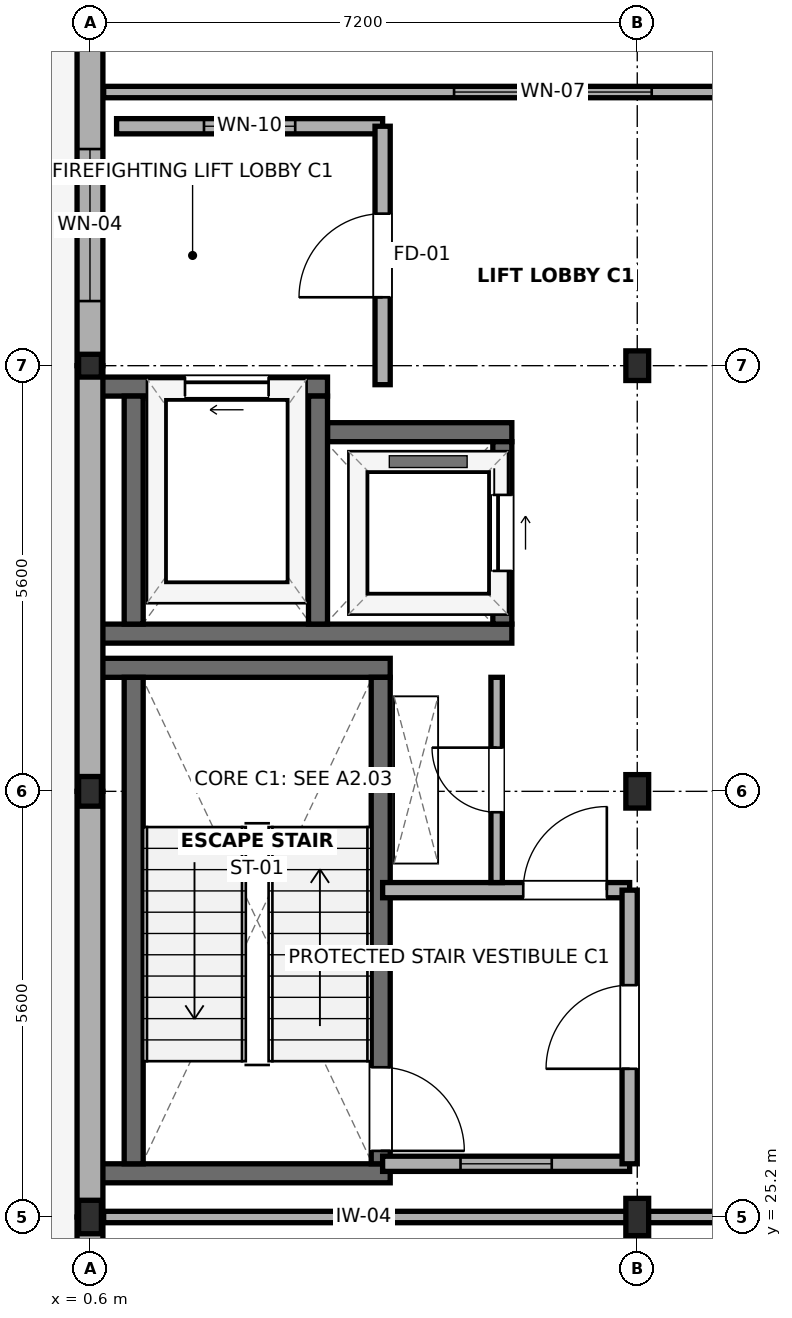
"""IFC4 building model, lengths in metres.
Left out: names, types, materials, properties, quantities, classifications, styles, units other than length and angle.
Written with IfcOpenShell. Run it as: python <this file> out.ifc"""

import sys

from ifc_helpers import new_model, si_unit, direction, frame, frame_2d, origin, origin_2d, place, context, subcontext, project, spatial, rectangle, i_section, extrude, element, fill, save


model = new_model("IFC4")
c1 = context("Model", 3, precision=1e-05, world=origin(), true_north=direction((0.0, 1.0)))
c2 = subcontext(c1, "Body", "Model", "MODEL_VIEW")
j1 = project(units=[si_unit("LENGTHUNIT", "METRE"), si_unit("PLANEANGLEUNIT", "RADIAN")], contexts=[c1])
p1 = place(None, origin())
s1 = spatial("IfcSite", under=j1, at=p1, CompositionType="ELEMENT")
p2 = place(p1, origin())
s2 = spatial("IfcBuilding", under=s1, at=p2, CompositionType="ELEMENT")
p3 = place(p2, frame((0.0, 0.0, 28.8)))
s3 = spatial("IfcBuildingStorey", under=s2, at=p3, CompositionType="ELEMENT", Elevation=28.8)
p4 = place(p3, frame((0.6, 25.2, 0.0), z_axis=(0.0, 0.0, 1.0), x_axis=(1.0, 0.0, 0.0)))
e1 = element("IfcColumn", 1, at=p4, inside=s3, PredefinedType="COLUMN", context=c2, shape_type="SweptSolid", body=[
    extrude(i_section(OverallWidth=0.3, OverallDepth=0.44, WebThickness=0.011, FlangeThickness=0.021, FilletRadius=0.027, at=origin_2d()), origin(), (0.0, 0.0, 1.0), 3.9),
])
p5 = place(p3, frame((0.6, 30.8, 0.0), z_axis=(0.0, 0.0, 1.0), x_axis=(1.0, 0.0, 0.0)))
e2 = element("IfcColumn", 2, at=p5, inside=s3, PredefinedType="COLUMN", context=c2, shape_type="SweptSolid", body=[
    extrude(i_section(OverallWidth=0.3, OverallDepth=0.39, WebThickness=0.011, FlangeThickness=0.019, FilletRadius=0.027, at=origin_2d()), origin(), (0.0, 0.0, 1.0), 3.9),
])
p6 = place(p3, frame((0.6, 36.4, 0.0), z_axis=(0.0, 0.0, 1.0), x_axis=(1.0, 0.0, 0.0)))
e3 = element("IfcColumn", 3, at=p6, inside=s3, PredefinedType="COLUMN", context=c2, shape_type="SweptSolid", body=[
    extrude(i_section(OverallWidth=0.3, OverallDepth=0.3, WebThickness=0.011, FlangeThickness=0.019, FilletRadius=0.027, at=origin_2d()), origin(), (0.0, 0.0, 1.0), 3.9),
])
p7 = place(p3, frame((7.8, 25.2, 0.0), z_axis=(0.0, 0.0, 1.0), x_axis=(1.0, 0.0, 0.0)))
e4 = element("IfcColumn", 4, at=p7, inside=s3, PredefinedType="COLUMN", context=c2, shape_type="SweptSolid", body=[
    extrude(i_section(OverallWidth=0.3, OverallDepth=0.49, WebThickness=0.012, FlangeThickness=0.023, FilletRadius=0.027, at=origin_2d()), origin(), (0.0, 0.0, 1.0), 3.9),
])
p8 = place(p3, frame((7.8, 30.8, 0.0), z_axis=(0.0, 0.0, 1.0), x_axis=(1.0, 0.0, 0.0)))
e5 = element("IfcColumn", 5, at=p8, inside=s3, PredefinedType="COLUMN", context=c2, shape_type="SweptSolid", body=[
    extrude(i_section(OverallWidth=0.3, OverallDepth=0.44, WebThickness=0.011, FlangeThickness=0.021, FilletRadius=0.027, at=origin_2d()), origin(), (0.0, 0.0, 1.0), 3.9),
])
p9 = place(p3, frame((7.8, 36.4, 0.0), z_axis=(0.0, 0.0, 1.0), x_axis=(1.0, 0.0, 0.0)))
e6 = element("IfcColumn", 6, at=p9, inside=s3, PredefinedType="COLUMN", context=c2, shape_type="SweptSolid", body=[
    extrude(i_section(OverallWidth=0.3, OverallDepth=0.39, WebThickness=0.011, FlangeThickness=0.019, FilletRadius=0.027, at=origin_2d()), origin(), (0.0, 0.0, 1.0), 3.9),
])
for number, where, z_axis, x_axis in (
    (7, (0.75, 25.775, 0.0), (0.0, 0.0, 1.0), (1.0, 0.0, 0.0)),
    (8, (0.75, 32.425, 0.0), (0.0, 0.0, 1.0), (1.0, 0.0, 0.0)),
):
    element("IfcWall", number, at=place(p3, frame(where, z_axis=z_axis, x_axis=x_axis)), inside=s3, PredefinedType="SHEAR", context=c2, shape_type="SweptSolid", body=[
        extrude(rectangle(XDim=3.8, YDim=0.25, at=frame_2d((1.9, 0.0))), origin(), (0.0, 0.0, 1.0), 3.72),
    ])
p10 = place(p3, frame((1.175, 25.9, 0.0), z_axis=(0.0, 0.0, 1.0), x_axis=(0.0, 1.0, 0.0)))
e9 = element("IfcWall", 9, at=p10, inside=s3, PredefinedType="SHEAR", context=c2, shape_type="SweptSolid", body=[
    extrude(rectangle(XDim=6.4, YDim=0.25, at=frame_2d((3.2, 0.0))), origin(), (0.0, 0.0, 1.0), 3.72),
])
p11 = place(p3, frame((4.425, 25.9, 0.0), z_axis=(0.0, 0.0, 1.0), x_axis=(0.0, 1.0, 0.0)))
e10 = element("IfcWall", 10, at=p11, inside=s3, PredefinedType="SHEAR", context=c2, shape_type="SweptSolid", body=[
    extrude(rectangle(XDim=6.4, YDim=0.25, at=frame_2d((3.2, 0.0))), origin(), (0.0, 0.0, 1.0), 3.72),
])
p12 = place(p11, frame((0.17, 0.0, 0.0)))
e11 = element("IfcOpeningElement", 11, at=p12, cuts=e10, PredefinedType="OPENING", context=c2, shape_type="SweptSolid", body=[
    extrude(rectangle(XDim=1.1, YDim=2.15, at=frame_2d((0.55, 1.075))), frame((0.0, 0.14, 0.0), z_axis=(0.0, -1.0, 0.0), x_axis=(1.0, 0.0, 0.0)), (0.0, 0.0, 1.0), 0.28),
])
p13 = place(p3, frame((0.75, 32.875, 0.0), z_axis=(0.0, 0.0, 1.0), x_axis=(1.0, 0.0, 0.0)))
e12 = element("IfcWall", 12, at=p13, inside=s3, PredefinedType="SHEAR", context=c2, shape_type="SweptSolid", body=[
    extrude(rectangle(XDim=5.4, YDim=0.25, at=frame_2d((2.7, 0.0))), origin(), (0.0, 0.0, 1.0), 3.72),
])
p14 = place(p3, frame((0.75, 36.125, 0.0), z_axis=(0.0, 0.0, 1.0), x_axis=(1.0, 0.0, 0.0)))
e13 = element("IfcWall", 13, at=p14, inside=s3, PredefinedType="SHEAR", context=c2, shape_type="SweptSolid", body=[
    extrude(rectangle(XDim=2.975, YDim=0.25, at=frame_2d((1.488, 0.0))), origin(), (0.0, 0.0, 1.0), 3.72),
])
p15 = place(p14, frame((1.1, 0.0, 0.0)))
e14 = element("IfcOpeningElement", 14, at=p15, cuts=e13, PredefinedType="OPENING", context=c2, shape_type="SweptSolid", body=[
    extrude(rectangle(XDim=1.1, YDim=2.15, at=frame_2d((0.55, 1.075))), frame((0.0, 0.14, 0.0), z_axis=(0.0, -1.0, 0.0), x_axis=(1.0, 0.0, 0.0)), (0.0, 0.0, 1.0), 0.28),
])
p16 = place(p3, frame((3.725, 35.525, 0.0), z_axis=(0.0, 0.0, 1.0), x_axis=(1.0, 0.0, 0.0)))
e15 = element("IfcWall", 15, at=p16, inside=s3, PredefinedType="SHEAR", context=c2, shape_type="SweptSolid", body=[
    extrude(rectangle(XDim=2.425, YDim=0.25, at=frame_2d((1.212, 0.0))), origin(), (0.0, 0.0, 1.0), 3.72),
])
for number, where, z_axis, x_axis in (
    (16, (1.175, 33.0, 0.0), (0.0, 0.0, 1.0), (0.0, 1.0, 0.0)),
    (17, (3.6, 33.0, 0.0), (0.0, 0.0, 1.0), (0.0, 1.0, 0.0)),
):
    element("IfcWall", number, at=place(p3, frame(where, z_axis=z_axis, x_axis=x_axis)), inside=s3, PredefinedType="SHEAR", context=c2, shape_type="SweptSolid", body=[
        extrude(rectangle(XDim=3.0, YDim=0.25, at=frame_2d((1.5, 0.0))), origin(), (0.0, 0.0, 1.0), 3.72),
    ])
p17 = place(p3, frame((6.025, 33.0, 0.0), z_axis=(0.0, 0.0, 1.0), x_axis=(0.0, 1.0, 0.0)))
e18 = element("IfcWall", 18, at=p17, inside=s3, PredefinedType="SHEAR", context=c2, shape_type="SweptSolid", body=[
    extrude(rectangle(XDim=2.4, YDim=0.25, at=frame_2d((1.2, 0.0))), origin(), (0.0, 0.0, 1.0), 3.72),
])
p18 = place(p17, frame((0.7, 0.0, 0.0)))
e19 = element("IfcOpeningElement", 19, at=p18, cuts=e18, PredefinedType="OPENING", context=c2, shape_type="SweptSolid", body=[
    extrude(rectangle(XDim=1.0, YDim=2.15, at=frame_2d((0.5, 1.075))), frame((0.0, 0.14, 0.0), z_axis=(0.0, -1.0, 0.0), x_axis=(1.0, 0.0, 0.0)), (0.0, 0.0, 1.0), 0.28),
])
p19 = place(p3, frame((0.6, 17.23, 0.0), z_axis=(0.0, 0.0, 1.0), x_axis=(0.0, 1.0, 0.0)))
e20 = element("IfcWall", 20, at=p19, inside=s3, PredefinedType="SOLIDWALL", context=c2, shape_type="SweptSolid", body=[
    extrude(rectangle(XDim=7.97, YDim=0.34, at=frame_2d((3.985, 0.0))), origin(), (0.0, 0.0, 1.0), 3.265),
])
p20 = place(p3, frame((0.6, 25.2, 0.0), z_axis=(0.0, 0.0, 1.0), x_axis=(0.0, 1.0, 0.0)))
e21 = element("IfcWall", 21, at=p20, inside=s3, PredefinedType="SOLIDWALL", context=c2, shape_type="SweptSolid", body=[
    extrude(rectangle(XDim=5.6, YDim=0.34, at=frame_2d((2.8, 0.0))), origin(), (0.0, 0.0, 1.0), 3.265),
])
p21 = place(p3, frame((0.6, 30.8, 0.0), z_axis=(0.0, 0.0, 1.0), x_axis=(0.0, 1.0, 0.0)))
e22 = element("IfcWall", 22, at=p21, inside=s3, PredefinedType="SOLIDWALL", context=c2, shape_type="SweptSolid", body=[
    extrude(rectangle(XDim=5.6, YDim=0.34, at=frame_2d((2.8, 0.0))), origin(), (0.0, 0.0, 1.0), 3.115),
])
p22 = place(p3, frame((0.6, 36.4, 0.0), z_axis=(0.0, 0.0, 1.0), x_axis=(0.0, 1.0, 0.0)))
e23 = element("IfcWall", 23, at=p22, inside=s3, PredefinedType="SOLIDWALL", context=c2, shape_type="SweptSolid", body=[
    extrude(rectangle(XDim=5.6, YDim=0.34, at=frame_2d((2.8, 0.0))), origin(), (0.0, 0.0, 1.0), 3.115),
])
p23 = place(p22, frame((0.85, 0.0, 0.9)))
e24 = element("IfcOpeningElement", 24, at=p23, cuts=e23, PredefinedType="OPENING", context=c2, shape_type="SweptSolid", body=[
    extrude(rectangle(XDim=2.0, YDim=1.8, at=frame_2d((1.0, 0.9))), frame((0.0, 0.185, 0.0), z_axis=(0.0, -1.0, 0.0), x_axis=(1.0, 0.0, 0.0)), (0.0, 0.0, 1.0), 0.37),
])
p24 = place(p3, frame((0.95, 39.55, 0.0), z_axis=(0.0, 0.0, 1.0), x_axis=(1.0, 0.0, 0.0)))
e25 = element("IfcWall", 25, at=p24, inside=s3, PredefinedType="PARTITIONING", context=c2, shape_type="SweptSolid", body=[
    extrude(rectangle(XDim=3.5, YDim=0.2, at=frame_2d((1.75, 0.0))), origin(), (0.0, 0.0, 1.0), 3.715),
])
p25 = place(p24, frame((1.15, 0.0, 0.95)))
e26 = element("IfcOpeningElement", 26, at=p25, cuts=e25, PredefinedType="OPENING", context=c2, shape_type="SweptSolid", body=[
    extrude(rectangle(XDim=1.2, YDim=1.5, at=frame_2d((0.6, 0.75))), frame((0.0, 0.115, 0.0), z_axis=(0.0, -1.0, 0.0), x_axis=(1.0, 0.0, 0.0)), (0.0, 0.0, 1.0), 0.23),
])
p26 = place(p3, frame((4.45, 36.15, 0.0), z_axis=(0.0, 0.0, 1.0), x_axis=(0.0, 1.0, 0.0)))
e27 = element("IfcWall", 27, at=p26, inside=s3, PredefinedType="PARTITIONING", context=c2, shape_type="SweptSolid", body=[
    extrude(rectangle(XDim=3.4, YDim=0.2, at=frame_2d((1.7, 0.0))), origin(), (0.0, 0.0, 1.0), 3.115),
])
p27 = place(p26, frame((1.15, 0.0, 0.0)))
e28 = element("IfcOpeningElement", 28, at=p27, cuts=e27, PredefinedType="OPENING", context=c2, shape_type="SweptSolid", body=[
    extrude(rectangle(XDim=1.1, YDim=2.15, at=frame_2d((0.55, 1.075))), frame((0.0, 0.115, 0.0), z_axis=(0.0, -1.0, 0.0), x_axis=(1.0, 0.0, 0.0)), (0.0, 0.0, 1.0), 0.23),
])
p28 = place(p3, frame((4.45, 25.9, 0.0), z_axis=(0.0, 0.0, 1.0), x_axis=(1.0, 0.0, 0.0)))
e29 = element("IfcWall", 29, at=p28, inside=s3, PredefinedType="PARTITIONING", context=c2, shape_type="SweptSolid", body=[
    extrude(rectangle(XDim=3.25, YDim=0.2, at=frame_2d((1.625, 0.0))), origin(), (0.0, 0.0, 1.0), 3.385),
])
p29 = place(p28, frame((1.025, 0.0, 0.95)))
e30 = element("IfcOpeningElement", 30, at=p29, cuts=e29, PredefinedType="OPENING", context=c2, shape_type="SweptSolid", body=[
    extrude(rectangle(XDim=1.2, YDim=1.5, at=frame_2d((0.6, 0.75))), frame((0.0, 0.115, 0.0), z_axis=(0.0, -1.0, 0.0), x_axis=(1.0, 0.0, 0.0)), (0.0, 0.0, 1.0), 0.23),
])
p30 = place(p3, frame((4.45, 29.5, 0.0), z_axis=(0.0, 0.0, 1.0), x_axis=(1.0, 0.0, 0.0)))
e31 = element("IfcWall", 31, at=p30, inside=s3, PredefinedType="PARTITIONING", context=c2, shape_type="SweptSolid", body=[
    extrude(rectangle(XDim=3.25, YDim=0.2, at=frame_2d((1.625, 0.0))), origin(), (0.0, 0.0, 1.0), 3.385),
])
p31 = place(p30, frame((1.85, 0.0, 0.0)))
e32 = element("IfcOpeningElement", 32, at=p31, cuts=e31, PredefinedType="OPENING", context=c2, shape_type="SweptSolid", body=[
    extrude(rectangle(XDim=1.1, YDim=2.15, at=frame_2d((0.55, 1.075))), frame((0.0, 0.115, 0.0), z_axis=(0.0, -1.0, 0.0), x_axis=(1.0, 0.0, 0.0)), (0.0, 0.0, 1.0), 0.23),
])
p32 = place(p3, frame((7.7, 25.9, 0.0), z_axis=(0.0, 0.0, 1.0), x_axis=(0.0, 1.0, 0.0)))
e33 = element("IfcWall", 33, at=p32, inside=s3, PredefinedType="PARTITIONING", context=c2, shape_type="SweptSolid", body=[
    extrude(rectangle(XDim=3.6, YDim=0.2, at=frame_2d((1.8, 0.0))), origin(), (0.0, 0.0, 1.0), 3.385),
])
p33 = place(p32, frame((1.25, 0.0, 0.0)))
e34 = element("IfcOpeningElement", 34, at=p33, cuts=e33, PredefinedType="OPENING", context=c2, shape_type="SweptSolid", body=[
    extrude(rectangle(XDim=1.1, YDim=2.15, at=frame_2d((0.55, 1.075))), frame((0.0, 0.115, 0.0), z_axis=(0.0, -1.0, 0.0), x_axis=(1.0, 0.0, 0.0)), (0.0, 0.0, 1.0), 0.23),
])
p34 = place(p3, frame((5.95, 29.6, 0.0), z_axis=(0.0, 0.0, 1.0), x_axis=(0.0, 1.0, 0.0)))
e35 = element("IfcWall", 35, at=p34, inside=s3, PredefinedType="PARTITIONING", context=c2, shape_type="SweptSolid", body=[
    extrude(rectangle(XDim=2.7, YDim=0.15, at=frame_2d((1.35, 0.0))), origin(), (0.0, 0.0, 1.0), 3.715),
])
p35 = place(p34, frame((0.925, 0.0, 0.0)))
e36 = element("IfcOpeningElement", 36, at=p35, cuts=e35, PredefinedType="OPENING", context=c2, shape_type="SweptSolid", body=[
    extrude(rectangle(XDim=0.85, YDim=2.1, at=frame_2d((0.425, 1.05))), frame((0.0, 0.09, 0.0), z_axis=(0.0, -1.0, 0.0), x_axis=(1.0, 0.0, 0.0)), (0.0, 0.0, 1.0), 0.18),
])
p36 = place(p3, frame((0.78, 25.2, 0.0), z_axis=(0.0, 0.0, 1.0), x_axis=(1.0, 0.0, 0.0)))
e37 = element("IfcWall", 37, at=p36, inside=s3, PredefinedType="PARTITIONING", context=c2, shape_type="SweptSolid", body=[
    extrude(rectangle(XDim=11.82, YDim=0.15, at=frame_2d((5.91, 0.0))), origin(), (0.0, 0.0, 1.0), 3.165),
])
p37 = place(p3, frame((0.78, 40.0, 0.0), z_axis=(0.0, 0.0, 1.0), x_axis=(1.0, 0.0, 0.0)))
e38 = element("IfcWall", 38, at=p37, inside=s3, PredefinedType="PARTITIONING", context=c2, shape_type="SweptSolid", body=[
    extrude(rectangle(XDim=11.82, YDim=0.15, at=frame_2d((5.91, 0.0))), origin(), (0.0, 0.0, 1.0), 3.115),
])
p38 = place(p37, frame((4.61, 0.0, 0.95)))
e39 = element("IfcOpeningElement", 39, at=p38, cuts=e38, PredefinedType="OPENING", context=c2, shape_type="SweptSolid", body=[
    extrude(rectangle(XDim=2.6, YDim=1.5, at=frame_2d((1.3, 0.75))), frame((0.0, 0.09, 0.0), z_axis=(0.0, -1.0, 0.0), x_axis=(1.0, 0.0, 0.0)), (0.0, 0.0, 1.0), 0.18),
])
p39 = place(p23, origin())
e40 = element("IfcWindow", 40, at=p39, inside=s3, PartitioningType="SINGLE_PANEL", PredefinedType="WINDOW", context=c2, shape_type="SweptSolid", body=[
    extrude(rectangle(XDim=2.0, YDim=1.8, at=frame_2d((1.0, 0.9))), frame((0.0, 0.03, 0.0), z_axis=(0.0, -1.0, 0.0), x_axis=(1.0, 0.0, 0.0)), (0.0, 0.0, 1.0), 0.06),
])
fill(e24, e40)
p40 = place(p12, frame((1.1, 0.0, 0.0), z_axis=(0.0, 0.0, 1.0), x_axis=(-1.0, 0.0, 0.0)))
e41 = element("IfcDoor", 41, at=p40, inside=s3, OperationType="SINGLE_SWING_RIGHT", PredefinedType="DOOR", context=c2, shape_type="SweptSolid", body=[
    extrude(rectangle(XDim=1.1, YDim=2.15, at=frame_2d((0.55, 1.075))), frame((0.0, 0.025, 0.0), z_axis=(0.0, -1.0, 0.0), x_axis=(1.0, 0.0, 0.0)), (0.0, 0.0, 1.0), 0.05),
])
fill(e11, e41)
p41 = place(p15, origin())
e42 = element("IfcDoor", 42, at=p41, inside=s3, OperationType="SLIDING_TO_LEFT", PredefinedType="DOOR", context=c2, shape_type="SweptSolid", body=[
    extrude(rectangle(XDim=1.1, YDim=2.15, at=frame_2d((0.55, 1.075))), frame((0.0, 0.025, 0.0), z_axis=(0.0, -1.0, 0.0), x_axis=(1.0, 0.0, 0.0)), (0.0, 0.0, 1.0), 0.05),
])
fill(e14, e42)
p42 = place(p18, frame((1.0, 0.0, 0.0), z_axis=(0.0, 0.0, 1.0), x_axis=(-1.0, 0.0, 0.0)))
e43 = element("IfcDoor", 43, at=p42, inside=s3, OperationType="SLIDING_TO_RIGHT", PredefinedType="DOOR", context=c2, shape_type="SweptSolid", body=[
    extrude(rectangle(XDim=1.0, YDim=2.15, at=frame_2d((0.5, 1.075))), frame((0.0, 0.025, 0.0), z_axis=(0.0, -1.0, 0.0), x_axis=(1.0, 0.0, 0.0)), (0.0, 0.0, 1.0), 0.05),
])
fill(e19, e43)
p43 = place(p25, origin())
e44 = element("IfcWindow", 44, at=p43, inside=s3, PartitioningType="SINGLE_PANEL", PredefinedType="WINDOW", context=c2, shape_type="SweptSolid", body=[
    extrude(rectangle(XDim=1.2, YDim=1.5, at=frame_2d((0.6, 0.75))), frame((0.0, 0.03, 0.0), z_axis=(0.0, -1.0, 0.0), x_axis=(1.0, 0.0, 0.0)), (0.0, 0.0, 1.0), 0.06),
])
fill(e26, e44)
p44 = place(p27, origin())
e45 = element("IfcDoor", 45, at=p44, inside=s3, OperationType="SINGLE_SWING_LEFT", PredefinedType="DOOR", context=c2, shape_type="SweptSolid", body=[
    extrude(rectangle(XDim=1.1, YDim=2.15, at=frame_2d((0.55, 1.075))), frame((0.0, 0.025, 0.0), z_axis=(0.0, -1.0, 0.0), x_axis=(1.0, 0.0, 0.0)), (0.0, 0.0, 1.0), 0.05),
])
fill(e28, e45)
p45 = place(p29, origin())
e46 = element("IfcWindow", 46, at=p45, inside=s3, PartitioningType="SINGLE_PANEL", PredefinedType="WINDOW", context=c2, shape_type="SweptSolid", body=[
    extrude(rectangle(XDim=1.2, YDim=1.5, at=frame_2d((0.6, 0.75))), frame((0.0, 0.03, 0.0), z_axis=(0.0, -1.0, 0.0), x_axis=(1.0, 0.0, 0.0)), (0.0, 0.0, 1.0), 0.06),
])
fill(e30, e46)
p46 = place(p31, origin())
e47 = element("IfcDoor", 47, at=p46, inside=s3, OperationType="SINGLE_SWING_RIGHT", PredefinedType="DOOR", context=c2, shape_type="SweptSolid", body=[
    extrude(rectangle(XDim=1.1, YDim=2.15, at=frame_2d((0.55, 1.075))), frame((0.0, 0.025, 0.0), z_axis=(0.0, -1.0, 0.0), x_axis=(1.0, 0.0, 0.0)), (0.0, 0.0, 1.0), 0.05),
])
fill(e32, e47)
p47 = place(p33, origin())
e48 = element("IfcDoor", 48, at=p47, inside=s3, OperationType="SINGLE_SWING_LEFT", PredefinedType="DOOR", context=c2, shape_type="SweptSolid", body=[
    extrude(rectangle(XDim=1.1, YDim=2.15, at=frame_2d((0.55, 1.075))), frame((0.0, 0.025, 0.0), z_axis=(0.0, -1.0, 0.0), x_axis=(1.0, 0.0, 0.0)), (0.0, 0.0, 1.0), 0.05),
])
fill(e34, e48)
p48 = place(p35, origin())
e49 = element("IfcDoor", 49, at=p48, inside=s3, OperationType="SINGLE_SWING_RIGHT", PredefinedType="DOOR", context=c2, shape_type="SweptSolid", body=[
    extrude(rectangle(XDim=0.85, YDim=2.1, at=frame_2d((0.425, 1.05))), frame((0.0, 0.025, 0.0), z_axis=(0.0, -1.0, 0.0), x_axis=(1.0, 0.0, 0.0)), (0.0, 0.0, 1.0), 0.05),
])
fill(e36, e49)
p49 = place(p38, origin())
e50 = element("IfcWindow", 50, at=p49, inside=s3, PartitioningType="SINGLE_PANEL", PredefinedType="WINDOW", context=c2, shape_type="SweptSolid", body=[
    extrude(rectangle(XDim=2.6, YDim=1.5, at=frame_2d((1.3, 0.75))), frame((0.0, 0.03, 0.0), z_axis=(0.0, -1.0, 0.0), x_axis=(1.0, 0.0, 0.0)), (0.0, 0.0, 1.0), 0.06),
])
fill(e39, e50)
save(model, sys.argv[1])
